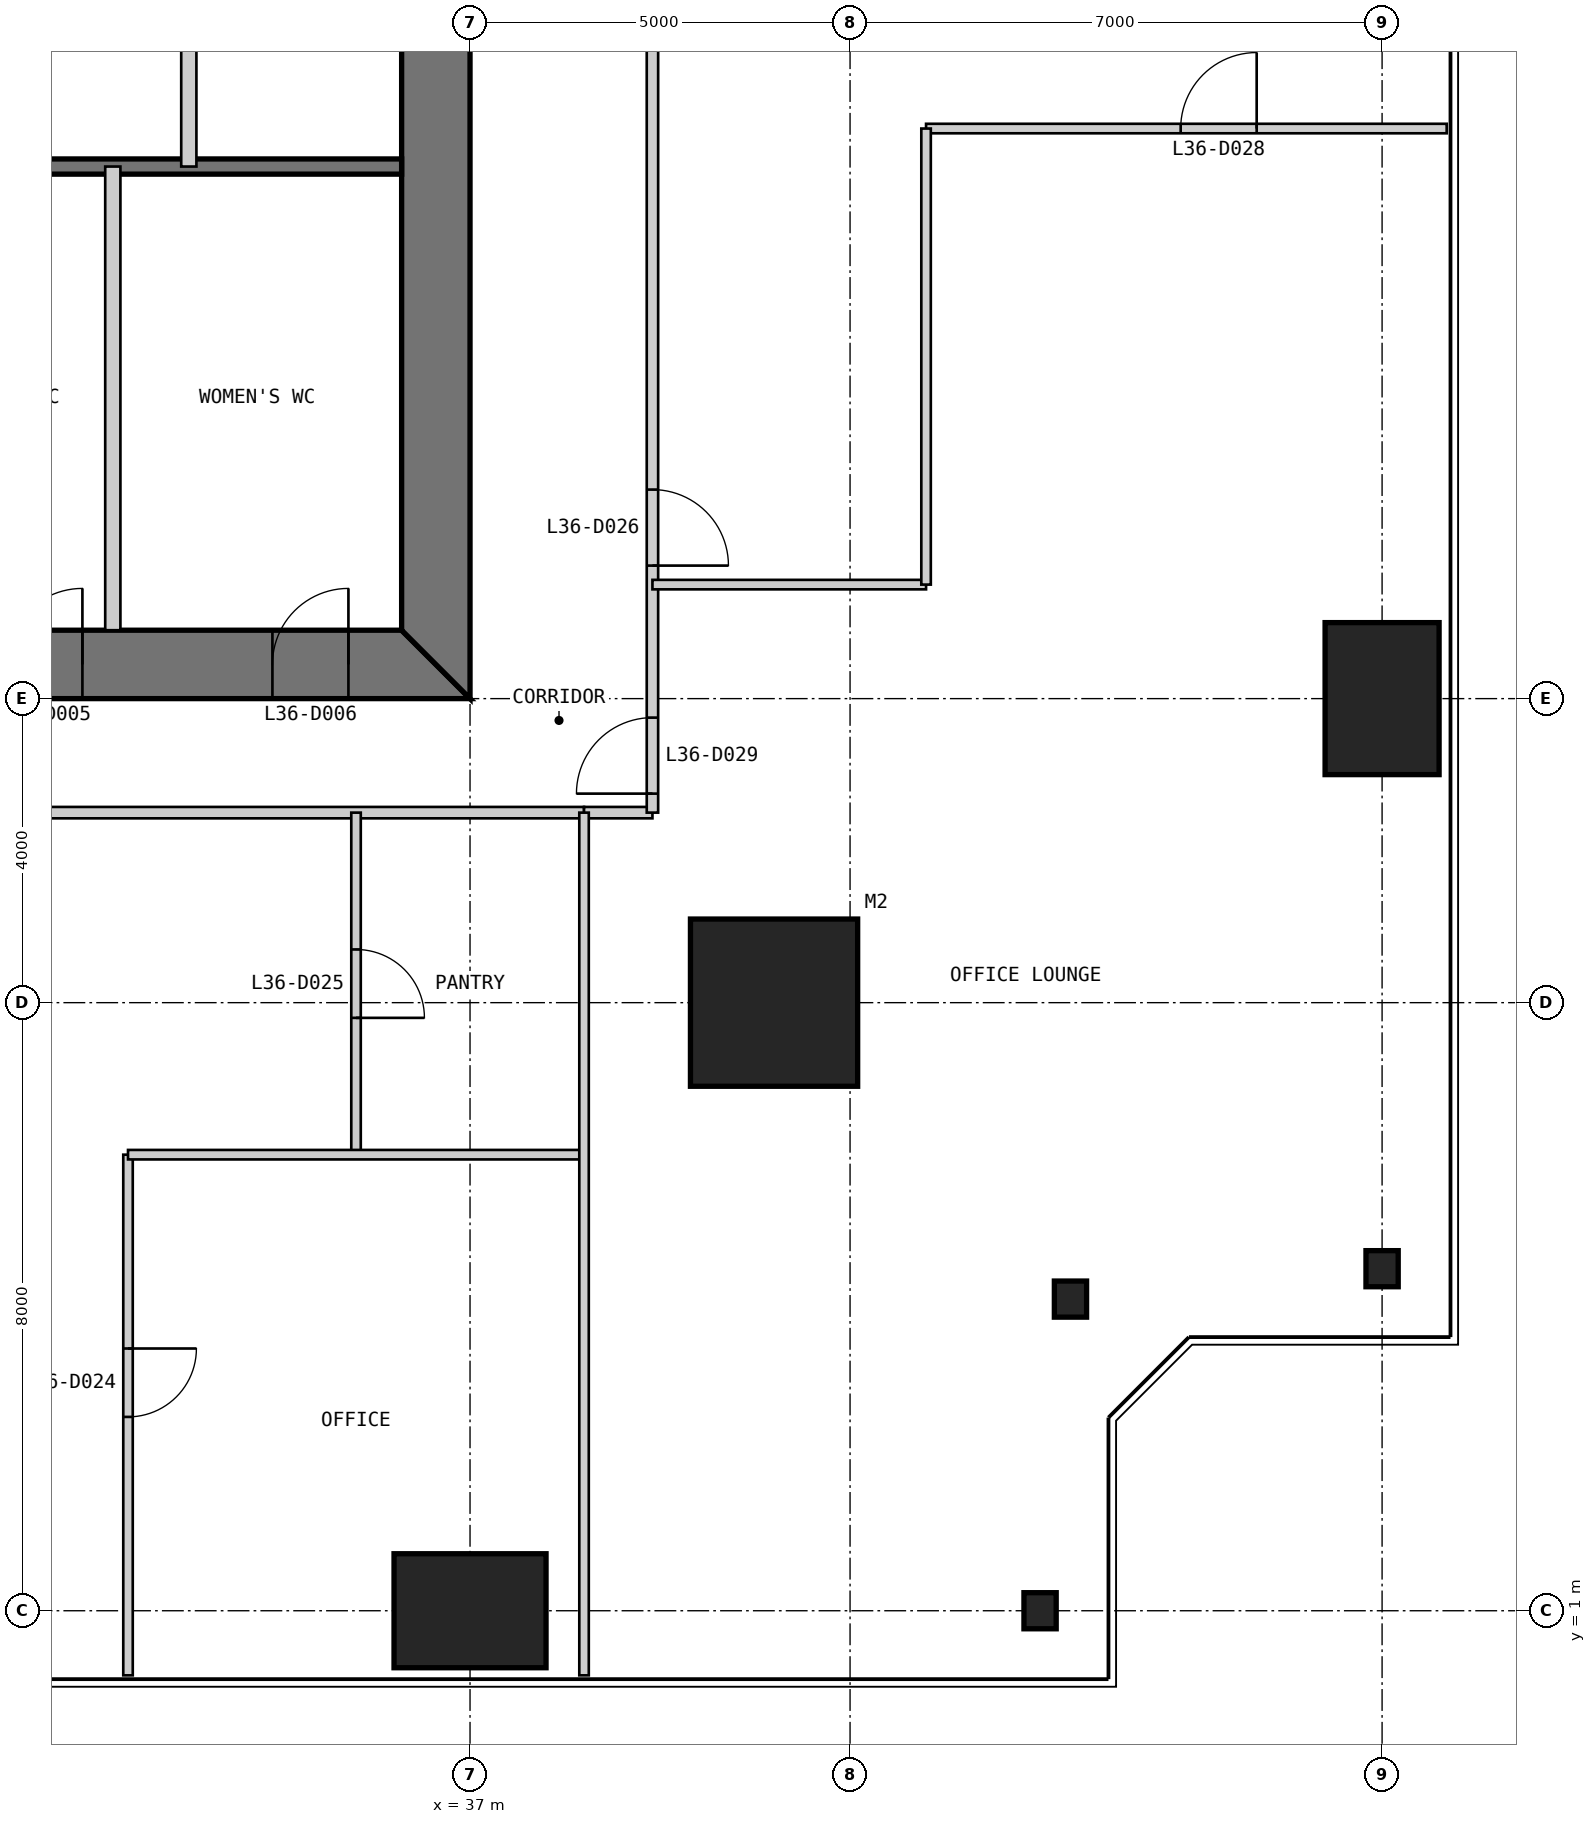
"""IFC4 building model, lengths in metres.
Left out: names, types, materials, properties, quantities, classifications, styles, units other than length and angle.
Written with IfcOpenShell. Run it as: python <this file> out.ifc"""

import sys

from ifc_helpers import new_model, si_unit, direction, frame, frame_2d, origin, origin_2d, place, context, subcontext, project, spatial, polyline, rectangle, i_section, outline, extrude, element, fill, save


model = new_model("IFC4")
c1 = context("Model", 3, precision=1e-05, world=origin(), true_north=direction((0.0, 1.0)))
c2 = subcontext(c1, "Body", "Model", "MODEL_VIEW")
j1 = project(units=[si_unit("LENGTHUNIT", "METRE"), si_unit("PLANEANGLEUNIT", "RADIAN")], contexts=[c1])
p1 = place(None, origin())
s1 = spatial("IfcSite", under=j1, at=p1, CompositionType="ELEMENT")
p2 = place(p1, origin())
s2 = spatial("IfcBuilding", under=s1, at=p2, CompositionType="ELEMENT")
p3 = place(p2, frame((0.0, 0.0, 154.4)))
s3 = spatial("IfcBuildingStorey", under=s2, at=p3, CompositionType="ELEMENT", Elevation=154.4)
p4 = place(p3, frame((41.0, 9.0, 0.0), z_axis=(0.0, 0.0, 1.0), x_axis=(1.0, 0.0, 0.0)))
e1 = element("IfcColumn", 1, at=p4, inside=s3, PredefinedType="COLUMN", context=c2, shape_type="SweptSolid", body=[
    extrude(rectangle(XDim=2.2, YDim=2.2, at=origin_2d()), origin(), (0.0, 0.0, 1.0), 4.0),
])
p5 = place(p3, frame((37.0, 1.0, 0.0), z_axis=(0.0, 0.0, 1.0), x_axis=(1.0, 0.0, 0.0)))
e2 = element("IfcColumn", 2, at=p5, inside=s3, PredefinedType="COLUMN", context=c2, shape_type="SweptSolid", body=[
    extrude(rectangle(XDim=2.0, YDim=1.5, at=origin_2d()), origin(), (0.0, 0.0, 1.0), 4.0),
])
for number, where, z_axis, x_axis in (
    (3, (44.5, 1.0, 0.0), (0.0, 0.0, 1.0), (1.0, 0.0, 0.0)),
    (4, (44.9, 5.1, 0.0), (0.0, 0.0, 1.0), (1.0, 0.0, 0.0)),
    (5, (49.0, 5.5, 0.0), (0.0, 0.0, 1.0), (1.0, 0.0, 0.0)),
):
    element("IfcColumn", number, at=place(p3, frame(where, z_axis=z_axis, x_axis=x_axis)), inside=s3, PredefinedType="COLUMN", context=c2, shape_type="SweptSolid", body=[
        extrude(i_section(OverallWidth=0.424, OverallDepth=0.475, WebThickness=0.048, FlangeThickness=0.077, at=origin_2d()), origin(), (0.0, 0.0, 1.0), 4.0),
    ])
p6 = place(p3, frame((49.0, 13.0, 0.0), z_axis=(0.0, 0.0, 1.0), x_axis=(1.0, 0.0, 0.0)))
e6 = element("IfcColumn", 6, at=p6, inside=s3, PredefinedType="COLUMN", context=c2, shape_type="SweptSolid", body=[
    extrude(rectangle(XDim=1.5, YDim=2.0, at=origin_2d()), origin(), (0.0, 0.0, 1.0), 4.0),
])
p7 = place(p3, frame((13.0, 13.45, 0.0), z_axis=(0.0, 0.0, 1.0), x_axis=(1.0, 0.0, 0.0)))
e7 = element("IfcWall", 7, at=p7, inside=s3, PredefinedType="SHEAR", context=c2, shape_type="SweptSolid", body=[
    extrude(outline(polyline([(0.0, -0.45), (24.0, -0.45), (23.1, 0.45), (0.9, 0.45), (0.0, -0.45)])), origin(), (0.0, 0.0, 1.0), 4.0),
])
p8 = place(p7, frame((4.9, 0.0, 0.0)))
e8 = element("IfcOpeningElement", 8, at=p8, cuts=e7, PredefinedType="OPENING", context=c2, shape_type="SweptSolid", body=[
    extrude(rectangle(XDim=1.0, YDim=2.2, at=frame_2d((0.5, 1.1))), frame((0.0, 0.46, 0.0), z_axis=(0.0, -1.0, 0.0), x_axis=(1.0, 0.0, 0.0)), (0.0, 0.0, 1.0), 0.92),
])
p9 = place(p7, frame((8.9, 0.0, 0.0)))
e9 = element("IfcOpeningElement", 9, at=p9, cuts=e7, PredefinedType="OPENING", context=c2, shape_type="SweptSolid", body=[
    extrude(rectangle(XDim=1.1, YDim=2.2, at=frame_2d((0.55, 1.1))), frame((0.0, 0.46, 0.0), z_axis=(0.0, -1.0, 0.0), x_axis=(1.0, 0.0, 0.0)), (0.0, 0.0, 1.0), 0.92),
])
p10 = place(p7, frame((15.05, 0.0, 0.0)))
e10 = element("IfcOpeningElement", 10, at=p10, cuts=e7, PredefinedType="OPENING", context=c2, shape_type="SweptSolid", body=[
    extrude(rectangle(XDim=0.9, YDim=2.2, at=frame_2d((0.45, 1.1))), frame((0.0, 0.46, 0.0), z_axis=(0.0, -1.0, 0.0), x_axis=(1.0, 0.0, 0.0)), (0.0, 0.0, 1.0), 0.92),
])
p11 = place(p7, frame((17.9, 0.0, 0.0)))
e11 = element("IfcOpeningElement", 11, at=p11, cuts=e7, PredefinedType="OPENING", context=c2, shape_type="SweptSolid", body=[
    extrude(rectangle(XDim=1.0, YDim=2.2, at=frame_2d((0.5, 1.1))), frame((0.0, 0.46, 0.0), z_axis=(0.0, -1.0, 0.0), x_axis=(1.0, 0.0, 0.0)), (0.0, 0.0, 1.0), 0.92),
])
p12 = place(p7, frame((21.4, 0.0, 0.0)))
e12 = element("IfcOpeningElement", 12, at=p12, cuts=e7, PredefinedType="OPENING", context=c2, shape_type="SweptSolid", body=[
    extrude(rectangle(XDim=1.0, YDim=2.2, at=frame_2d((0.5, 1.1))), frame((0.0, 0.46, 0.0), z_axis=(0.0, -1.0, 0.0), x_axis=(1.0, 0.0, 0.0)), (0.0, 0.0, 1.0), 0.92),
])
p13 = place(p3, frame((36.55, 13.9, 0.0), z_axis=(0.0, 0.0, 1.0), x_axis=(0.0, 1.0, 0.0)))
e13 = element("IfcWall", 13, at=p13, inside=s3, PredefinedType="SHEAR", context=c2, shape_type="SweptSolid", body=[
    extrude(outline(polyline([(-0.9, -0.45), (23.1, -0.45), (22.2, 0.45), (0.0, 0.45), (-0.9, -0.45)])), origin(), (0.0, 0.0, 1.0), 4.0),
])
p14 = place(p13, frame((20.2, 0.0, 0.0)))
e14 = element("IfcOpeningElement", 14, at=p14, cuts=e13, PredefinedType="OPENING", context=c2, shape_type="SweptSolid", body=[
    extrude(rectangle(XDim=1.0, YDim=2.2, at=frame_2d((0.5, 1.1))), frame((0.0, 0.46, 0.0), z_axis=(0.0, -1.0, 0.0), x_axis=(1.0, 0.0, 0.0)), (0.0, 0.0, 1.0), 0.92),
])
p15 = place(p13, frame((17.25, 0.0, 0.0)))
e15 = element("IfcOpeningElement", 15, at=p15, cuts=e13, PredefinedType="OPENING", context=c2, shape_type="SweptSolid", body=[
    extrude(rectangle(XDim=0.9, YDim=2.2, at=frame_2d((0.45, 1.1))), frame((0.0, 0.46, 0.0), z_axis=(0.0, -1.0, 0.0), x_axis=(1.0, 0.0, 0.0)), (0.0, 0.0, 1.0), 0.92),
])
p16 = place(p3, frame((20.3, 20.0, 0.0), z_axis=(0.0, 0.0, 1.0), x_axis=(1.0, 0.0, 0.0)))
e16 = element("IfcWall", 16, at=p16, inside=s3, PredefinedType="SOLIDWALL", context=c2, shape_type="SweptSolid", body=[
    extrude(rectangle(XDim=15.8, YDim=0.2, at=frame_2d((7.9, 0.0))), origin(), (0.0, 0.0, 1.0), 3.8),
])
p17 = place(p3, frame((32.3, 13.9, 0.0), z_axis=(0.0, 0.0, 1.0), x_axis=(0.0, 1.0, 0.0)))
e17 = element("IfcWall", 17, at=p17, inside=s3, PredefinedType="PARTITIONING", context=c2, shape_type="SweptSolid", body=[
    extrude(rectangle(XDim=6.1, YDim=0.2, at=frame_2d((3.05, 0.0))), origin(), (0.0, 0.0, 1.0), 3.8),
])
p18 = place(p3, frame((33.3, 36.1, 0.0), z_axis=(0.0, 0.0, 1.0), x_axis=(0.0, -1.0, 0.0)))
e18 = element("IfcWall", 18, at=p18, inside=s3, PredefinedType="PARTITIONING", context=c2, shape_type="SweptSolid", body=[
    extrude(rectangle(XDim=16.1, YDim=0.2, at=frame_2d((8.05, 0.0))), origin(), (0.0, 0.0, 1.0), 3.8),
])
p19 = place(p3, frame((11.5, 11.5, 0.0), z_axis=(0.0, 0.0, 1.0), x_axis=(1.0, 0.0, 0.0)))
e19 = element("IfcWall", 19, at=p19, inside=s3, PredefinedType="PARTITIONING", context=c2, shape_type="SweptSolid", body=[
    extrude(rectangle(XDim=27.0, YDim=0.15, at=frame_2d((13.5, 0.0))), origin(), (0.0, 0.0, 1.0), 3.85),
])
p20 = place(p19, frame((3.25, 0.0, 0.0)))
e20 = element("IfcOpeningElement", 20, at=p20, cuts=e19, PredefinedType="OPENING", context=c2, shape_type="SweptSolid", body=[
    extrude(rectangle(XDim=1.0, YDim=2.2, at=frame_2d((0.5, 1.1))), frame((0.0, 0.085, 0.0), z_axis=(0.0, -1.0, 0.0), x_axis=(1.0, 0.0, 0.0)), (0.0, 0.0, 1.0), 0.17),
])
p21 = place(p19, frame((16.0, 0.0, 0.0)))
e21 = element("IfcOpeningElement", 21, at=p21, cuts=e19, PredefinedType="OPENING", context=c2, shape_type="SweptSolid", body=[
    extrude(rectangle(XDim=1.0, YDim=2.2, at=frame_2d((0.5, 1.1))), frame((0.0, 0.085, 0.0), z_axis=(0.0, -1.0, 0.0), x_axis=(1.0, 0.0, 0.0)), (0.0, 0.0, 1.0), 0.17),
])
p22 = place(p3, frame((32.5, 0.15, 0.0), z_axis=(0.0, 0.0, 1.0), x_axis=(0.0, 1.0, 0.0)))
e22 = element("IfcWall", 22, at=p22, inside=s3, PredefinedType="PARTITIONING", context=c2, shape_type="SweptSolid", body=[
    extrude(rectangle(XDim=6.85, YDim=0.125, at=frame_2d((3.425, 0.0))), origin(), (0.0, 0.0, 1.0), 3.85),
])
p23 = place(p22, frame((3.4, 0.0, 0.0)))
e23 = element("IfcOpeningElement", 23, at=p23, cuts=e22, PredefinedType="OPENING", context=c2, shape_type="SweptSolid", body=[
    extrude(rectangle(XDim=0.9, YDim=2.2, at=frame_2d((0.45, 1.1))), frame((0.0, 0.073, 0.0), z_axis=(0.0, -1.0, 0.0), x_axis=(1.0, 0.0, 0.0)), (0.0, 0.0, 1.0), 0.145),
])
p24 = place(p3, frame((35.5, 7.0, 0.0), z_axis=(0.0, 0.0, 1.0), x_axis=(0.0, 1.0, 0.0)))
e24 = element("IfcWall", 24, at=p24, inside=s3, PredefinedType="PARTITIONING", context=c2, shape_type="SweptSolid", body=[
    extrude(rectangle(XDim=4.5, YDim=0.125, at=frame_2d((2.25, 0.0))), origin(), (0.0, 0.0, 1.0), 3.85),
])
p25 = place(p24, frame((1.8, 0.0, 0.0)))
e25 = element("IfcOpeningElement", 25, at=p25, cuts=e24, PredefinedType="OPENING", context=c2, shape_type="SweptSolid", body=[
    extrude(rectangle(XDim=0.9, YDim=2.2, at=frame_2d((0.45, 1.1))), frame((0.0, 0.073, 0.0), z_axis=(0.0, -1.0, 0.0), x_axis=(1.0, 0.0, 0.0)), (0.0, 0.0, 1.0), 0.145),
])
p26 = place(p3, frame((32.5, 7.0, 0.0), z_axis=(0.0, 0.0, 1.0), x_axis=(1.0, 0.0, 0.0)))
e26 = element("IfcWall", 26, at=p26, inside=s3, PredefinedType="PARTITIONING", context=c2, shape_type="SweptSolid", body=[
    extrude(rectangle(XDim=6.0, YDim=0.125, at=frame_2d((3.0, 0.0))), origin(), (0.0, 0.0, 1.0), 3.85),
])
p27 = place(p3, frame((38.5, 11.5, 0.0), z_axis=(0.0, 0.0, 1.0), x_axis=(1.0, 0.0, 0.0)))
e27 = element("IfcWall", 27, at=p27, inside=s3, PredefinedType="PARTITIONING", context=c2, shape_type="SweptSolid", body=[
    extrude(rectangle(XDim=0.9, YDim=0.15, at=frame_2d((0.45, 0.0))), origin(), (0.0, 0.0, 1.0), 3.85),
])
p28 = place(p3, frame((39.4, 11.5, 0.0), z_axis=(0.0, 0.0, 1.0), x_axis=(0.0, 1.0, 0.0)))
e28 = element("IfcWall", 28, at=p28, inside=s3, PredefinedType="PARTITIONING", context=c2, shape_type="SweptSolid", body=[
    extrude(rectangle(XDim=27.0, YDim=0.15, at=frame_2d((13.5, 0.0))), origin(), (0.0, 0.0, 1.0), 3.85),
])
p29 = place(p28, frame((3.25, 0.0, 0.0)))
e29 = element("IfcOpeningElement", 29, at=p29, cuts=e28, PredefinedType="OPENING", context=c2, shape_type="SweptSolid", body=[
    extrude(rectangle(XDim=1.0, YDim=2.2, at=frame_2d((0.5, 1.1))), frame((0.0, 0.085, 0.0), z_axis=(0.0, -1.0, 0.0), x_axis=(1.0, 0.0, 0.0)), (0.0, 0.0, 1.0), 0.17),
])
p30 = place(p28, frame((22.75, 0.0, 0.0)))
e30 = element("IfcOpeningElement", 30, at=p30, cuts=e28, PredefinedType="OPENING", context=c2, shape_type="SweptSolid", body=[
    extrude(rectangle(XDim=1.0, YDim=2.2, at=frame_2d((0.5, 1.1))), frame((0.0, 0.085, 0.0), z_axis=(0.0, -1.0, 0.0), x_axis=(1.0, 0.0, 0.0)), (0.0, 0.0, 1.0), 0.17),
])
p31 = place(p28, frame((0.25, 0.0, 0.0)))
e31 = element("IfcOpeningElement", 31, at=p31, cuts=e28, PredefinedType="OPENING", context=c2, shape_type="SweptSolid", body=[
    extrude(rectangle(XDim=1.0, YDim=2.2, at=frame_2d((0.5, 1.1))), frame((0.0, 0.085, 0.0), z_axis=(0.0, -1.0, 0.0), x_axis=(1.0, 0.0, 0.0)), (0.0, 0.0, 1.0), 0.17),
])
p32 = place(p3, frame((38.5, 0.15, 0.0), z_axis=(0.0, 0.0, 1.0), x_axis=(0.0, 1.0, 0.0)))
e32 = element("IfcWall", 32, at=p32, inside=s3, PredefinedType="PARTITIONING", context=c2, shape_type="SweptSolid", body=[
    extrude(rectangle(XDim=11.35, YDim=0.125, at=frame_2d((5.675, 0.0))), origin(), (0.0, 0.0, 1.0), 3.85),
])
p33 = place(p3, frame((43.0, 14.5, 0.0), z_axis=(0.0, 0.0, 1.0), x_axis=(-1.0, 0.0, 0.0)))
e33 = element("IfcWall", 33, at=p33, inside=s3, PredefinedType="PARTITIONING", context=c2, shape_type="SweptSolid", body=[
    extrude(rectangle(XDim=3.6, YDim=0.125, at=frame_2d((1.8, 0.0))), origin(), (0.0, 0.0, 1.0), 3.85),
])
p34 = place(p3, frame((49.85, 20.5, 0.0), z_axis=(0.0, 0.0, 1.0), x_axis=(-1.0, 0.0, 0.0)))
e34 = element("IfcWall", 34, at=p34, inside=s3, PredefinedType="PARTITIONING", context=c2, shape_type="SweptSolid", body=[
    extrude(rectangle(XDim=6.85, YDim=0.125, at=frame_2d((3.425, 0.0))), origin(), (0.0, 0.0, 1.0), 3.85),
])
p35 = place(p34, frame((2.5, 0.0, 0.0)))
e35 = element("IfcOpeningElement", 35, at=p35, cuts=e34, PredefinedType="OPENING", context=c2, shape_type="SweptSolid", body=[
    extrude(rectangle(XDim=1.0, YDim=2.2, at=frame_2d((0.5, 1.1))), frame((0.0, 0.073, 0.0), z_axis=(0.0, -1.0, 0.0), x_axis=(1.0, 0.0, 0.0)), (0.0, 0.0, 1.0), 0.145),
])
p36 = place(p3, frame((43.0, 14.5, 0.0), z_axis=(0.0, 0.0, 1.0), x_axis=(0.0, 1.0, 0.0)))
e36 = element("IfcWall", 36, at=p36, inside=s3, PredefinedType="PARTITIONING", context=c2, shape_type="SweptSolid", body=[
    extrude(rectangle(XDim=6.0, YDim=0.125, at=frame_2d((3.0, 0.0))), origin(), (0.0, 0.0, 1.0), 3.238),
])
p37 = place(p11, origin())
e37 = element("IfcDoor", 37, at=p37, inside=s3, OperationType="SINGLE_SWING_RIGHT", PredefinedType="DOOR", context=c2, shape_type="SweptSolid", body=[
    extrude(rectangle(XDim=1.0, YDim=2.2, at=frame_2d((0.5, 1.1))), frame((0.0, 0.025, 0.0), z_axis=(0.0, -1.0, 0.0), x_axis=(1.0, 0.0, 0.0)), (0.0, 0.0, 1.0), 0.05),
    extrude(outline(polyline([(0.0, 0.0), (0.04, 0.0), (0.04, 2.16), (0.96, 2.16), (0.96, 0.0), (1.0, 0.0), (1.0, 2.2), (0.0, 2.2), (0.0, 0.0)])), frame((0.0, 0.3, 0.0), z_axis=(0.0, -1.0, 0.0), x_axis=(1.0, 0.0, 0.0)), (0.0, 0.0, 1.0), 0.6),
])
fill(e11, e37)
p38 = place(p12, origin())
e38 = element("IfcDoor", 38, at=p38, inside=s3, OperationType="SINGLE_SWING_RIGHT", PredefinedType="DOOR", context=c2, shape_type="SweptSolid", body=[
    extrude(rectangle(XDim=1.0, YDim=2.2, at=frame_2d((0.5, 1.1))), frame((0.0, 0.025, 0.0), z_axis=(0.0, -1.0, 0.0), x_axis=(1.0, 0.0, 0.0)), (0.0, 0.0, 1.0), 0.05),
    extrude(outline(polyline([(0.0, 0.0), (0.04, 0.0), (0.04, 2.16), (0.96, 2.16), (0.96, 0.0), (1.0, 0.0), (1.0, 2.2), (0.0, 2.2), (0.0, 0.0)])), frame((0.0, 0.3, 0.0), z_axis=(0.0, -1.0, 0.0), x_axis=(1.0, 0.0, 0.0)), (0.0, 0.0, 1.0), 0.6),
])
fill(e12, e38)
p39 = place(p23, frame((0.9, 0.0, 0.0), z_axis=(0.0, 0.0, 1.0), x_axis=(-1.0, 0.0, 0.0)))
e39 = element("IfcDoor", 39, at=p39, inside=s3, OperationType="SINGLE_SWING_LEFT", PredefinedType="DOOR", context=c2, shape_type="SweptSolid", body=[
    extrude(rectangle(XDim=0.9, YDim=2.2, at=frame_2d((0.45, 1.1))), frame((0.0, 0.025, 0.0), z_axis=(0.0, -1.0, 0.0), x_axis=(1.0, 0.0, 0.0)), (0.0, 0.0, 1.0), 0.05),
])
fill(e23, e39)
p40 = place(p25, frame((0.9, 0.0, 0.0), z_axis=(0.0, 0.0, 1.0), x_axis=(-1.0, 0.0, 0.0)))
e40 = element("IfcDoor", 40, at=p40, inside=s3, OperationType="SINGLE_SWING_RIGHT", PredefinedType="DOOR", context=c2, shape_type="SweptSolid", body=[
    extrude(rectangle(XDim=0.9, YDim=2.2, at=frame_2d((0.45, 1.1))), frame((0.0, 0.025, 0.0), z_axis=(0.0, -1.0, 0.0), x_axis=(1.0, 0.0, 0.0)), (0.0, 0.0, 1.0), 0.05),
])
fill(e25, e40)
p41 = place(p29, frame((1.0, 0.0, 0.0), z_axis=(0.0, 0.0, 1.0), x_axis=(-1.0, 0.0, 0.0)))
e41 = element("IfcDoor", 41, at=p41, inside=s3, OperationType="SINGLE_SWING_RIGHT", PredefinedType="DOOR", context=c2, shape_type="SweptSolid", body=[
    extrude(rectangle(XDim=1.0, YDim=2.2, at=frame_2d((0.5, 1.1))), frame((0.0, 0.025, 0.0), z_axis=(0.0, -1.0, 0.0), x_axis=(1.0, 0.0, 0.0)), (0.0, 0.0, 1.0), 0.05),
])
fill(e29, e41)
p42 = place(p35, frame((1.0, 0.0, 0.0), z_axis=(0.0, 0.0, 1.0), x_axis=(-1.0, 0.0, 0.0)))
e42 = element("IfcDoor", 42, at=p42, inside=s3, OperationType="SINGLE_SWING_RIGHT", PredefinedType="DOOR", context=c2, shape_type="SweptSolid", body=[
    extrude(rectangle(XDim=1.0, YDim=2.2, at=frame_2d((0.5, 1.1))), frame((0.0, 0.025, 0.0), z_axis=(0.0, -1.0, 0.0), x_axis=(1.0, 0.0, 0.0)), (0.0, 0.0, 1.0), 0.05),
])
fill(e35, e42)
p43 = place(p31, origin())
e43 = element("IfcDoor", 43, at=p43, inside=s3, OperationType="SINGLE_SWING_LEFT", PredefinedType="DOOR", context=c2, shape_type="SweptSolid", body=[
    extrude(rectangle(XDim=1.0, YDim=2.2, at=frame_2d((0.5, 1.1))), frame((0.0, 0.025, 0.0), z_axis=(0.0, -1.0, 0.0), x_axis=(1.0, 0.0, 0.0)), (0.0, 0.0, 1.0), 0.05),
])
fill(e31, e43)
save(model, sys.argv[1])
